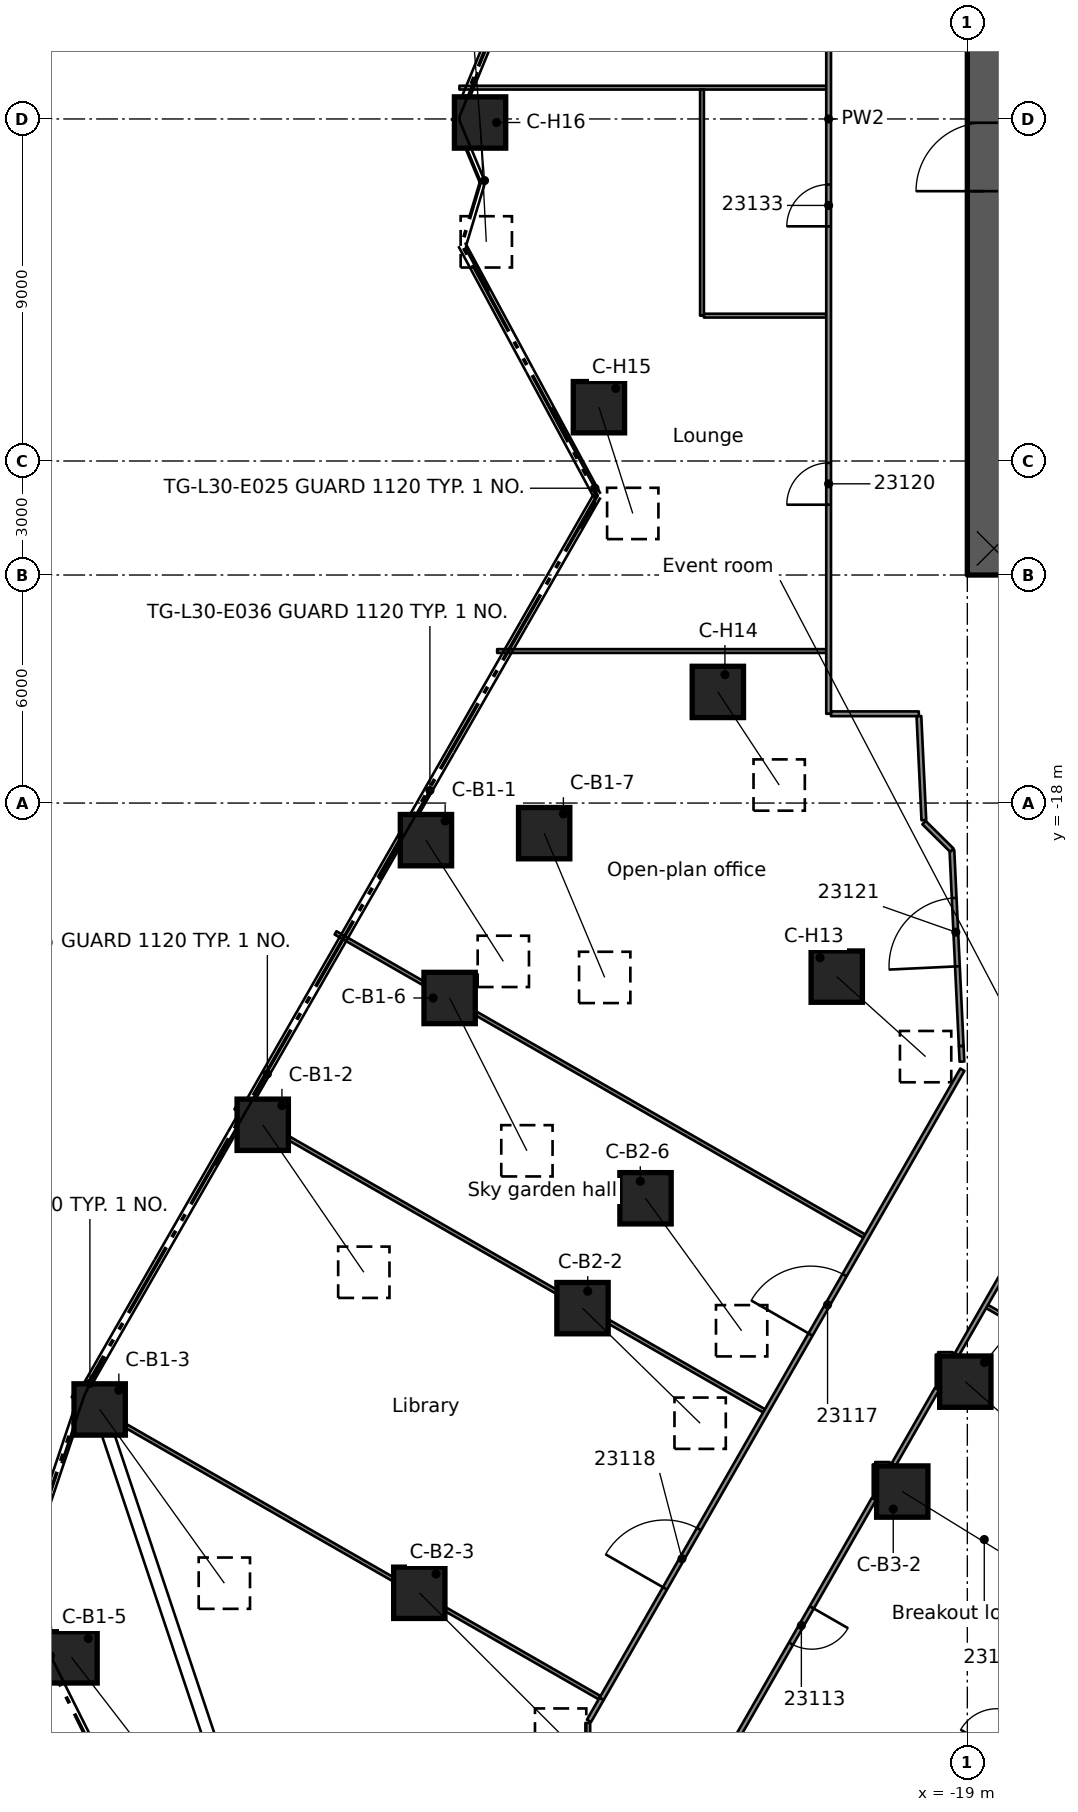
"""IFC4 building model, lengths in metres.
Left out: names, types, materials, properties, quantities, classifications, styles, units other than length and angle.
Written with IfcOpenShell. Run it as: python <this file> out.ifc"""

import sys

from ifc_helpers import new_model, si_unit, direction, frame, frame_2d, origin, origin_2d, place, context, subcontext, project, spatial, rectangle, extrude, element, fill, save


model = new_model("IFC4")
c1 = context("Model", 3, precision=1e-05, world=origin(), true_north=direction((0.0, 1.0)))
c2 = subcontext(c1, "Body", "Model", "MODEL_VIEW")
j1 = project(units=[si_unit("LENGTHUNIT", "METRE"), si_unit("PLANEANGLEUNIT", "RADIAN")], contexts=[c1])
p1 = place(None, origin())
s1 = spatial("IfcSite", under=j1, at=p1, CompositionType="ELEMENT")
p2 = place(p1, origin())
s2 = spatial("IfcBuilding", under=s1, at=p2, CompositionType="ELEMENT")
p3 = place(p2, frame((0.0, 0.0, 119.7)))
s3 = spatial("IfcBuildingStorey", under=s2, at=p3, CompositionType="ELEMENT", Elevation=119.7)
p4 = place(p3, frame((-18.55, -12.0, 0.0), z_axis=(0.0, 0.0, 1.0), x_axis=(0.0, 1.0, 0.0)))
e1 = element("IfcWall", 1, at=p4, inside=s3, PredefinedType="SHEAR", context=c2, shape_type="SweptSolid", body=[
    extrude(rectangle(XDim=24.0, YDim=0.9, at=frame_2d((12.0, 0.0))), origin(), (0.0, 0.0, 1.0), 4.0),
])
p5 = place(p4, frame((10.1, 0.0, 0.0)))
e2 = element("IfcOpeningElement", 2, at=p5, cuts=e1, PredefinedType="OPENING", context=c2, shape_type="SweptSolid", body=[
    extrude(rectangle(XDim=1.8, YDim=2.1, at=frame_2d((0.9, 1.05))), frame((0.0, 0.46, 0.0), z_axis=(0.0, -1.0, 0.0), x_axis=(1.0, 0.0, 0.0)), (0.0, 0.0, 1.0), 0.92),
])
p6 = place(p3, frame((-33.246, -18.976, 0.533), z_axis=(0.42526001455, -0.666240689462, 0.612598778754), x_axis=(0.842922209578, 0.538035452922, 0.0)))
e3 = element("IfcColumn", 3, at=p6, inside=s3, PredefinedType="COLUMN", context=c2, shape_type="SweptSolid", body=[
    extrude(rectangle(XDim=1.35, YDim=1.35, at=origin_2d()), origin(), (0.0, 0.0, 1.0), 4.788),
])
p7 = place(p3, frame((-37.541, -26.465, 0.578), z_axis=(0.483790970838, -0.7058596854, 0.517405451326), x_axis=(0.824852608837, 0.565347834253, 0.0)))
e4 = element("IfcColumn", 4, at=p7, inside=s3, PredefinedType="COLUMN", context=c2, shape_type="SweptSolid", body=[
    extrude(rectangle(XDim=1.35, YDim=1.35, at=origin_2d()), origin(), (0.0, 0.0, 1.0), 5.498),
])
p8 = place(p3, frame((-41.832, -33.956, 0.605), z_axis=(0.522399558772, -0.727798715596, 0.44430589752), x_axis=(0.812388559252, 0.583116479613, 0.0)))
e5 = element("IfcColumn", 5, at=p8, inside=s3, PredefinedType="COLUMN", context=c2, shape_type="SweptSolid", body=[
    extrude(rectangle(XDim=1.35, YDim=1.35, at=origin_2d()), origin(), (0.0, 0.0, 1.0), 6.281),
])
p9 = place(p3, frame((-42.572, -40.479, 0.617), z_axis=(0.558056931018, -0.723205019199, 0.406874626816), x_axis=(0.791699702042, 0.610910453165, 0.0)))
e6 = element("IfcColumn", 6, at=p9, inside=s3, PredefinedType="COLUMN", context=c2, shape_type="SweptSolid", body=[
    extrude(rectangle(XDim=1.35, YDim=1.35, at=origin_2d()), origin(), (0.0, 0.0, 1.0), 6.8),
])
p10 = place(p3, frame((-32.623, -23.129, 0.57), z_axis=(0.38108787128, -0.753393018843, 0.535883376791), x_axis=(0.892337017902, 0.451369744757, 0.0)))
e7 = element("IfcColumn", 7, at=p10, inside=s3, PredefinedType="COLUMN", context=c2, shape_type="SweptSolid", body=[
    extrude(rectangle(XDim=1.35, YDim=1.35, at=origin_2d()), origin(), (0.0, 0.0, 1.0), 5.337),
])
p11 = place(p3, frame((-30.135, -18.792, 0.552), z_axis=(0.316509269945, -0.754189445075, 0.575343517367), x_axis=(0.922091324428, 0.386972336757, 0.0)))
e8 = element("IfcColumn", 8, at=p11, inside=s3, PredefinedType="COLUMN", context=c2, shape_type="SweptSolid", body=[
    extrude(rectangle(XDim=1.35, YDim=1.35, at=origin_2d()), origin(), (0.0, 0.0, 1.0), 5.033),
])
p12 = place(p3, frame((-29.126, -31.29, 0.562), z_axis=(0.59544523528, -0.58257531381, 0.553218741116), x_axis=(0.699339877275, 0.714789294865, 0.0)))
e9 = element("IfcColumn", 9, at=p12, inside=s3, PredefinedType="COLUMN", context=c2, shape_type="SweptSolid", body=[
    extrude(rectangle(XDim=1.35, YDim=1.35, at=origin_2d()), origin(), (0.0, 0.0, 1.0), 5.198),
])
p13 = place(p3, frame((-33.421, -38.78, 0.595), z_axis=(0.623782368225, -0.623618570583, 0.471163915761), x_axis=(0.707013924092, 0.707199626088, 0.0)))
e10 = element("IfcColumn", 10, at=p13, inside=s3, PredefinedType="COLUMN", context=c2, shape_type="SweptSolid", body=[
    extrude(rectangle(XDim=1.35, YDim=1.35, at=origin_2d()), origin(), (0.0, 0.0, 1.0), 5.962),
])
p14 = place(p3, frame((-27.468, -28.399, 0.561), z_axis=(0.488269073322, -0.673037368275, 0.555530388857), x_axis=(0.809429244298, 0.587217420105, 0.0)))
e11 = element("IfcColumn", 11, at=p14, inside=s3, PredefinedType="COLUMN", context=c2, shape_type="SweptSolid", body=[
    extrude(rectangle(XDim=1.35, YDim=1.35, at=origin_2d()), origin(), (0.0, 0.0, 1.0), 5.18),
])
p15 = place(p3, frame((-20.712, -36.116, 0.554), z_axis=(0.698438997856, -0.429842046596, 0.572205191564), x_axis=(0.524126993738, 0.851640120259, 0.0)))
e12 = element("IfcColumn", 12, at=p15, inside=s3, PredefinedType="COLUMN", context=c2, shape_type="SweptSolid", body=[
    extrude(rectangle(XDim=1.35, YDim=1.35, at=origin_2d()), origin(), (0.0, 0.0, 1.0), 5.056),
])
p16 = place(p3, frame((-19.053, -33.224, 0.544), z_axis=(0.602598141129, -0.535091265352, 0.592075010494), x_axis=(0.663981445411, 0.747749048913, 0.0)))
e13 = element("IfcColumn", 13, at=p16, inside=s3, PredefinedType="COLUMN", context=c2, shape_type="SweptSolid", body=[
    extrude(rectangle(XDim=1.35, YDim=1.35, at=origin_2d()), origin(), (0.0, 0.0, 1.0), 4.918),
])
p17 = place(p3, frame((-22.436, -22.567, 0.486), z_axis=(0.535508605584, -0.48216463464, 0.693359790043), x_axis=(0.669123341136, 0.743151367049, 0.0)))
e14 = element("IfcColumn", 14, at=p17, inside=s3, PredefinedType="COLUMN", context=c2, shape_type="SweptSolid", body=[
    extrude(rectangle(XDim=1.35, YDim=1.35, at=origin_2d()), origin(), (0.0, 0.0, 1.0), 4.366),
])
p18 = place(p3, frame((-25.565, -15.076, 0.467), z_axis=(0.380287859943, -0.57724832469, 0.722610209742), x_axis=(0.835072028085, 0.550140625577, 0.0)))
e15 = element("IfcColumn", 15, at=p18, inside=s3, PredefinedType="COLUMN", context=c2, shape_type="SweptSolid", body=[
    extrude(rectangle(XDim=1.35, YDim=1.35, at=origin_2d()), origin(), (0.0, 0.0, 1.0), 4.244),
])
p19 = place(p3, frame((-28.694, -7.584, 0.467), z_axis=(0.20971851237, -0.658720900621, 0.722568280964), x_axis=(0.95287331329, 0.303368503341, 0.0)))
e16 = element("IfcColumn", 16, at=p19, inside=s3, PredefinedType="COLUMN", context=c2, shape_type="SweptSolid", body=[
    extrude(rectangle(XDim=1.35, YDim=1.35, at=origin_2d()), origin(), (0.0, 0.0, 1.0), 4.244),
])
p20 = place(p3, frame((-31.822, -0.093, 0.486), z_axis=(0.037582399141, -0.719490424028, 0.693484746052), x_axis=(0.998638551055, 0.052163630494, 0.0)))
e17 = element("IfcColumn", 17, at=p20, inside=s3, PredefinedType="COLUMN", context=c2, shape_type="SweptSolid", body=[
    extrude(rectangle(XDim=1.35, YDim=1.35, at=origin_2d()), origin(), (0.0, 0.0, 1.0), 4.365),
])
p21 = place(p3, frame((-20.274, -15.713, 0.0), z_axis=(0.0, 0.0, 1.0), x_axis=(0.047383187707, -0.998876785956, 0.0)))
e18 = element("IfcWall", 18, at=p21, inside=s3, PredefinedType="PARTITIONING", context=c2, shape_type="SweptSolid", body=[
    extrude(rectangle(XDim=2.741, YDim=0.125, at=frame_2d((1.371, 0.0))), origin(), (0.0, 0.0, 1.0), 3.58),
])
p22 = place(p3, frame((-19.161, -24.394, 0.0), z_axis=(0.0, 0.0, 1.0), x_axis=(-0.047513435417, 0.998870598954, 0.0)))
e19 = element("IfcWall", 19, at=p22, inside=s3, PredefinedType="PARTITIONING", context=c2, shape_type="SweptSolid", body=[
    extrude(rectangle(XDim=5.159, YDim=0.125, at=frame_2d((2.58, 0.0))), origin(), (0.0, 0.0, 1.0), 3.58),
])
p23 = place(p22, frame((2.1, 0.0, 0.0)))
e20 = element("IfcOpeningElement", 20, at=p23, cuts=e19, PredefinedType="OPENING", context=c2, shape_type="SweptSolid", body=[
    extrude(rectangle(XDim=1.8, YDim=2.1, at=frame_2d((0.9, 1.05))), frame((0.0, 0.073, 0.0), z_axis=(0.0, -1.0, 0.0), x_axis=(1.0, 0.0, 0.0)), (0.0, 0.0, 1.0), 0.145),
])
p24 = place(p3, frame((-19.161, -24.394, 0.0), z_axis=(0.0, 0.0, 1.0), x_axis=(0.048301764701, -0.998832788572, 0.0)))
e21 = element("IfcWall", 21, at=p24, inside=s3, PredefinedType="PARTITIONING", context=c2, shape_type="SweptSolid", body=[
    extrude(rectangle(XDim=0.409, YDim=0.125, at=frame_2d((0.205, 0.0))), origin(), (0.0, 0.0, 1.0), 3.58),
])
p25 = place(p3, frame((-42.542, -33.587, 0.0), z_axis=(0.0, 0.0, 1.0), x_axis=(0.867452469996, -0.497520062206, 0.0)))
e22 = element("IfcWall", 22, at=p25, inside=s3, PredefinedType="PARTITIONING", context=c2, shape_type="SweptSolid", body=[
    extrude(rectangle(XDim=15.984, YDim=0.1, at=frame_2d((7.992, 0.0))), origin(), (0.0, 0.0, 1.0), 3.58),
])
p26 = place(p3, frame((-38.261, -26.013, 0.0), z_axis=(0.0, 0.0, 1.0), x_axis=(0.867479537308, -0.497472865945, 0.0)))
e23 = element("IfcWall", 23, at=p26, inside=s3, PredefinedType="PARTITIONING", context=c2, shape_type="SweptSolid", body=[
    extrude(rectangle(XDim=16.037, YDim=0.1, at=frame_2d((8.019, 0.0))), origin(), (0.0, 0.0, 1.0), 3.58),
])
p27 = place(p3, frame((-35.625, -21.416, 0.0), z_axis=(0.0, 0.0, 1.0), x_axis=(0.867483304729, -0.497466296363, 0.0)))
e24 = element("IfcWall", 24, at=p27, inside=s3, PredefinedType="PARTITIONING", context=c2, shape_type="SweptSolid", body=[
    extrude(rectangle(XDim=16.037, YDim=0.1, at=frame_2d((8.019, 0.0))), origin(), (0.0, 0.0, 1.0), 3.58),
])
p28 = place(p3, frame((-18.481, -31.247, 0.0), z_axis=(0.0, 0.0, 1.0), x_axis=(0.867459879492, -0.497507143136, 0.0)))
e25 = element("IfcWall", 25, at=p28, inside=s3, PredefinedType="PARTITIONING", context=c2, shape_type="SweptSolid", body=[
    extrude(rectangle(XDim=5.974, YDim=0.1, at=frame_2d((2.987, 0.0))), origin(), (0.0, 0.0, 1.0), 3.58),
])
p29 = place(p3, frame((-21.426, -35.402, 0.0), z_axis=(0.0, 0.0, 1.0), x_axis=(1.0, 0.0, 0.0)))
e26 = element("IfcWall", 26, at=p29, inside=s3, PredefinedType="PARTITIONING", context=c2, shape_type="SweptSolid", body=[
    extrude(rectangle(XDim=0.382, YDim=0.125, at=frame_2d((0.191, 0.0))), origin(), (0.0, 0.0, 1.0), 3.58),
])
p30 = place(p3, frame((-19.768, -32.51, 0.0), z_axis=(0.0, 0.0, 1.0), x_axis=(1.0, 0.0, 0.0)))
e27 = element("IfcWall", 27, at=p30, inside=s3, PredefinedType="PARTITIONING", context=c2, shape_type="SweptSolid", body=[
    extrude(rectangle(XDim=0.383, YDim=0.125, at=frame_2d((0.191, 0.0))), origin(), (0.0, 0.0, 1.0), 3.58),
])
p31 = place(p3, frame((-22.587, -15.651, 0.0), z_axis=(0.0, 0.0, 1.0), x_axis=(1.0, 0.0, 0.0)))
e28 = element("IfcWall", 28, at=p31, inside=s3, PredefinedType="PARTITIONING", context=c2, shape_type="SweptSolid", body=[
    extrude(rectangle(XDim=2.31, YDim=0.125, at=frame_2d((1.155, 0.0))), origin(), (0.0, 0.0, 1.0), 3.58),
])
p32 = place(p3, frame((-31.372, -14.0, 0.0), z_axis=(0.0, 0.0, 1.0), x_axis=(1.0, 0.0, 0.0)))
e29 = element("IfcWall", 29, at=p32, inside=s3, PredefinedType="PARTITIONING", context=c2, shape_type="SweptSolid", body=[
    extrude(rectangle(XDim=8.66, YDim=0.1, at=frame_2d((4.33, 0.0))), origin(), (0.0, 0.0, 1.0), 3.58),
])
p33 = place(p3, frame((-25.932, -5.175, 0.0), z_axis=(0.0, 0.0, 1.0), x_axis=(1.0, 0.0, 0.0)))
e30 = element("IfcWall", 30, at=p33, inside=s3, PredefinedType="PARTITIONING", context=c2, shape_type="SweptSolid", body=[
    extrude(rectangle(XDim=3.22, YDim=0.1, at=frame_2d((1.61, 0.0))), origin(), (0.0, 0.0, 1.0), 3.58),
])
p34 = place(p3, frame((-32.365, 0.824, 0.0), z_axis=(0.0, 0.0, 1.0), x_axis=(1.0, 0.0, 0.0)))
e31 = element("IfcWall", 31, at=p34, inside=s3, PredefinedType="PARTITIONING", context=c2, shape_type="SweptSolid", body=[
    extrude(rectangle(XDim=9.653, YDim=0.1, at=frame_2d((4.827, 0.0))), origin(), (0.0, 0.0, 1.0), 3.58),
])
p35 = place(p3, frame((-20.14, -18.514, 0.0), z_axis=(0.0, 0.0, 1.0), x_axis=(0.710407658982, -0.703790421972, 0.0)))
e32 = element("IfcWall", 32, at=p35, inside=s3, PredefinedType="PARTITIONING", context=c2, shape_type="SweptSolid", body=[
    extrude(rectangle(XDim=1.033, YDim=0.125, at=frame_2d((0.517, 0.0))), origin(), (0.0, 0.0, 1.0), 3.58),
])
p36 = place(p3, frame((-28.956, -42.15, 0.0), z_axis=(0.0, 0.0, 1.0), x_axis=(0.498025161268, 0.867162579188, 0.0)))
e33 = element("IfcWall", 33, at=p36, inside=s3, PredefinedType="PARTITIONING", context=c2, shape_type="SweptSolid", body=[
    extrude(rectangle(XDim=0.669, YDim=0.125, at=frame_2d((0.334, 0.0))), origin(), (0.0, 0.0, 1.0), 3.58),
])
p37 = place(p3, frame((-20.106, -46.216, 0.0), z_axis=(0.0, 0.0, 1.0), x_axis=(0.497433217502, 0.867502273268, 0.0)))
e34 = element("IfcWall", 34, at=p37, inside=s3, PredefinedType="PARTITIONING", context=c2, shape_type="SweptSolid", body=[
    extrude(rectangle(XDim=18.559, YDim=0.125, at=frame_2d((9.28, 0.0))), origin(), (0.0, 0.0, 1.0), 3.58),
])
p38 = place(p37, frame((15.143, 0.0, 0.0)))
e35 = element("IfcOpeningElement", 35, at=p38, cuts=e34, PredefinedType="OPENING", context=c2, shape_type="SweptSolid", body=[
    extrude(rectangle(XDim=2.1, YDim=2.1, at=frame_2d((1.05, 1.05))), frame((0.0, 0.073, 0.0), z_axis=(0.0, -1.0, 0.0), x_axis=(1.0, 0.0, 0.0)), (0.0, 0.0, 1.0), 0.145),
])
p39 = place(p37, frame((3.788, 0.0, 0.0)))
e36 = element("IfcOpeningElement", 36, at=p39, cuts=e34, PredefinedType="OPENING", context=c2, shape_type="SweptSolid", body=[
    extrude(rectangle(XDim=1.1, YDim=2.1, at=frame_2d((0.55, 1.05))), frame((0.0, 0.073, 0.0), z_axis=(0.0, -1.0, 0.0), x_axis=(1.0, 0.0, 0.0)), (0.0, 0.0, 1.0), 0.145),
])
p40 = place(p3, frame((-21.458, -36.312, 0.0), z_axis=(0.0, 0.0, 1.0), x_axis=(-0.497504635005, -0.867461317955, 0.0)))
e37 = element("IfcWall", 37, at=p40, inside=s3, PredefinedType="PARTITIONING", context=c2, shape_type="SweptSolid", body=[
    extrude(rectangle(XDim=7.582, YDim=0.125, at=frame_2d((3.791, 0.0))), origin(), (0.0, 0.0, 1.0), 3.58),
])
p41 = place(p40, frame((3.288, 0.0, 0.0)))
e38 = element("IfcOpeningElement", 38, at=p41, cuts=e37, PredefinedType="OPENING", context=c2, shape_type="SweptSolid", body=[
    extrude(rectangle(XDim=1.1, YDim=2.1, at=frame_2d((0.55, 1.05))), frame((0.0, 0.073, 0.0), z_axis=(0.0, -1.0, 0.0), x_axis=(1.0, 0.0, 0.0)), (0.0, 0.0, 1.0), 0.145),
])
p42 = place(p3, frame((-20.935, -35.4, 0.0), z_axis=(0.0, 0.0, 1.0), x_axis=(0.497462427817, 0.86748552317, 0.0)))
e39 = element("IfcWall", 39, at=p42, inside=s3, PredefinedType="PARTITIONING", context=c2, shape_type="SweptSolid", body=[
    extrude(rectangle(XDim=2.283, YDim=0.125, at=frame_2d((1.142, 0.0))), origin(), (0.0, 0.0, 1.0), 3.58),
])
p43 = place(p3, frame((-19.277, -32.509, 0.0), z_axis=(0.0, 0.0, 1.0), x_axis=(0.497782718783, 0.867301772673, 0.0)))
e40 = element("IfcWall", 40, at=p43, inside=s3, PredefinedType="PARTITIONING", context=c2, shape_type="SweptSolid", body=[
    extrude(rectangle(XDim=7.098, YDim=0.125, at=frame_2d((3.549, 0.0))), origin(), (0.0, 0.0, 1.0), 3.58),
])
p44 = place(p3, frame((-28.623, -41.57, 0.0), z_axis=(0.0, 0.0, 1.0), x_axis=(0.497445996274, 0.867494945686, 0.0)))
e41 = element("IfcWall", 41, at=p44, inside=s3, PredefinedType="PARTITIONING", context=c2, shape_type="SweptSolid", body=[
    extrude(rectangle(XDim=19.081, YDim=0.125, at=frame_2d((9.541, 0.0))), origin(), (0.0, 0.0, 1.0), 3.58),
])
p45 = place(p44, frame((11.051, 0.0, 0.0)))
e42 = element("IfcOpeningElement", 42, at=p45, cuts=e41, PredefinedType="OPENING", context=c2, shape_type="SweptSolid", body=[
    extrude(rectangle(XDim=1.8, YDim=2.1, at=frame_2d((0.9, 1.05))), frame((0.0, 0.073, 0.0), z_axis=(0.0, -1.0, 0.0), x_axis=(1.0, 0.0, 0.0)), (0.0, 0.0, 1.0), 0.145),
])
p46 = place(p44, frame((3.35, 0.0, 0.0)))
e43 = element("IfcOpeningElement", 43, at=p46, cuts=e41, PredefinedType="OPENING", context=c2, shape_type="SweptSolid", body=[
    extrude(rectangle(XDim=1.8, YDim=2.1, at=frame_2d((0.9, 1.05))), frame((0.0, 0.073, 0.0), z_axis=(0.0, -1.0, 0.0), x_axis=(1.0, 0.0, 0.0)), (0.0, 0.0, 1.0), 0.145),
])
p47 = place(p3, frame((-19.768, -33.365, 0.0), z_axis=(0.0, 0.0, 1.0), x_axis=(0.0, 1.0, 0.0)))
e44 = element("IfcWall", 44, at=p47, inside=s3, PredefinedType="PARTITIONING", context=c2, shape_type="SweptSolid", body=[
    extrude(rectangle(XDim=0.855, YDim=0.125, at=frame_2d((0.427, 0.0))), origin(), (0.0, 0.0, 1.0), 3.58),
])
p48 = place(p3, frame((-21.426, -36.258, 0.0), z_axis=(0.0, 0.0, 1.0), x_axis=(0.0, 1.0, 0.0)))
e45 = element("IfcWall", 45, at=p48, inside=s3, PredefinedType="PARTITIONING", context=c2, shape_type="SweptSolid", body=[
    extrude(rectangle(XDim=0.856, YDim=0.125, at=frame_2d((0.428, 0.0))), origin(), (0.0, 0.0, 1.0), 3.58),
])
p49 = place(p3, frame((-22.65, -15.651, 0.0), z_axis=(0.0, 0.0, 1.0), x_axis=(0.0, 1.0, 0.0)))
e46 = element("IfcWall", 46, at=p49, inside=s3, PredefinedType="PARTITIONING", context=c2, shape_type="SweptSolid", body=[
    extrude(rectangle(XDim=31.302, YDim=0.125, at=frame_2d((15.651, 0.0))), origin(), (0.0, 0.0, 1.0), 3.58),
])
p50 = place(p49, frame((5.501, 0.0, 0.0)))
e47 = element("IfcOpeningElement", 47, at=p50, cuts=e46, PredefinedType="OPENING", context=c2, shape_type="SweptSolid", body=[
    extrude(rectangle(XDim=1.1, YDim=2.1, at=frame_2d((0.55, 1.05))), frame((0.0, 0.073, 0.0), z_axis=(0.0, -1.0, 0.0), x_axis=(1.0, 0.0, 0.0)), (0.0, 0.0, 1.0), 0.145),
])
p51 = place(p49, frame((12.826, 0.0, 0.0)))
e48 = element("IfcOpeningElement", 48, at=p51, cuts=e46, PredefinedType="OPENING", context=c2, shape_type="SweptSolid", body=[
    extrude(rectangle(XDim=1.1, YDim=2.1, at=frame_2d((0.55, 1.05))), frame((0.0, 0.073, 0.0), z_axis=(0.0, -1.0, 0.0), x_axis=(1.0, 0.0, 0.0)), (0.0, 0.0, 1.0), 0.145),
])
p52 = place(p3, frame((-25.982, -5.175, 0.0), z_axis=(0.0, 0.0, 1.0), x_axis=(0.0, 1.0, 0.0)))
e49 = element("IfcWall", 49, at=p52, inside=s3, PredefinedType="PARTITIONING", context=c2, shape_type="SweptSolid", body=[
    extrude(rectangle(XDim=5.949, YDim=0.1, at=frame_2d((2.975, 0.0))), origin(), (0.0, 0.0, 1.0), 3.58),
])
p53 = place(p3, frame((-28.987, -43.212, 0.0), z_axis=(0.0, 0.0, 1.0), x_axis=(0.0, 1.0, 0.0)))
e50 = element("IfcWall", 50, at=p53, inside=s3, PredefinedType="PARTITIONING", context=c2, shape_type="SweptSolid", body=[
    extrude(rectangle(XDim=1.008, YDim=0.125, at=frame_2d((0.504, 0.0))), origin(), (0.0, 0.0, 1.0), 3.58),
])
p54 = place(p5, origin())
e51 = element("IfcDoor", 51, at=p54, inside=s3, OperationType="SINGLE_SWING_LEFT", PredefinedType="DOOR", context=c2, shape_type="SweptSolid", body=[
    extrude(rectangle(XDim=1.8, YDim=2.1, at=frame_2d((0.9, 1.05))), frame((0.0, 0.025, 0.0), z_axis=(0.0, -1.0, 0.0), x_axis=(1.0, 0.0, 0.0)), (0.0, 0.0, 1.0), 0.05),
])
fill(e2, e51)
p55 = place(p41, origin())
e52 = element("IfcDoor", 52, at=p55, inside=s3, OperationType="SINGLE_SWING_RIGHT", PredefinedType="DOOR", context=c2, shape_type="SweptSolid", body=[
    extrude(rectangle(XDim=1.1, YDim=2.1, at=frame_2d((0.55, 1.05))), frame((0.0, 0.025, 0.0), z_axis=(0.0, -1.0, 0.0), x_axis=(1.0, 0.0, 0.0)), (0.0, 0.0, 1.0), 0.05),
])
fill(e38, e52)
p56 = place(p39, origin())
e53 = element("IfcDoor", 53, at=p56, inside=s3, OperationType="SINGLE_SWING_LEFT", PredefinedType="DOOR", context=c2, shape_type="SweptSolid", body=[
    extrude(rectangle(XDim=1.1, YDim=2.1, at=frame_2d((0.55, 1.05))), frame((0.0, 0.025, 0.0), z_axis=(0.0, -1.0, 0.0), x_axis=(1.0, 0.0, 0.0)), (0.0, 0.0, 1.0), 0.05),
])
fill(e36, e53)
p57 = place(p45, origin())
e54 = element("IfcDoor", 54, at=p57, inside=s3, OperationType="DOUBLE_DOOR_SINGLE_SWING", PredefinedType="DOOR", context=c2, shape_type="SweptSolid", body=[
    extrude(rectangle(XDim=1.8, YDim=2.1, at=frame_2d((0.9, 1.05))), frame((0.0, 0.025, 0.0), z_axis=(0.0, -1.0, 0.0), x_axis=(1.0, 0.0, 0.0)), (0.0, 0.0, 1.0), 0.05),
])
fill(e42, e54)
p58 = place(p46, origin())
e55 = element("IfcDoor", 55, at=p58, inside=s3, OperationType="DOUBLE_DOOR_SINGLE_SWING", PredefinedType="DOOR", context=c2, shape_type="SweptSolid", body=[
    extrude(rectangle(XDim=1.8, YDim=2.1, at=frame_2d((0.9, 1.05))), frame((0.0, 0.025, 0.0), z_axis=(0.0, -1.0, 0.0), x_axis=(1.0, 0.0, 0.0)), (0.0, 0.0, 1.0), 0.05),
])
fill(e43, e55)
p59 = place(p50, origin())
e56 = element("IfcDoor", 56, at=p59, inside=s3, OperationType="SINGLE_SWING_LEFT", PredefinedType="DOOR", context=c2, shape_type="SweptSolid", body=[
    extrude(rectangle(XDim=1.1, YDim=2.1, at=frame_2d((0.55, 1.05))), frame((0.0, 0.025, 0.0), z_axis=(0.0, -1.0, 0.0), x_axis=(1.0, 0.0, 0.0)), (0.0, 0.0, 1.0), 0.05),
])
fill(e47, e56)
p60 = place(p23, origin())
e57 = element("IfcDoor", 57, at=p60, inside=s3, OperationType="DOUBLE_DOOR_SINGLE_SWING", PredefinedType="DOOR", context=c2, shape_type="SweptSolid", body=[
    extrude(rectangle(XDim=1.8, YDim=2.1, at=frame_2d((0.9, 1.05))), frame((0.0, 0.025, 0.0), z_axis=(0.0, -1.0, 0.0), x_axis=(1.0, 0.0, 0.0)), (0.0, 0.0, 1.0), 0.05),
])
fill(e20, e57)
p61 = place(p51, origin())
e58 = element("IfcDoor", 58, at=p61, inside=s3, OperationType="SINGLE_SWING_LEFT", PredefinedType="DOOR", context=c2, shape_type="SweptSolid", body=[
    extrude(rectangle(XDim=1.1, YDim=2.1, at=frame_2d((0.55, 1.05))), frame((0.0, 0.025, 0.0), z_axis=(0.0, -1.0, 0.0), x_axis=(1.0, 0.0, 0.0)), (0.0, 0.0, 1.0), 0.05),
])
fill(e48, e58)
save(model, sys.argv[1])
